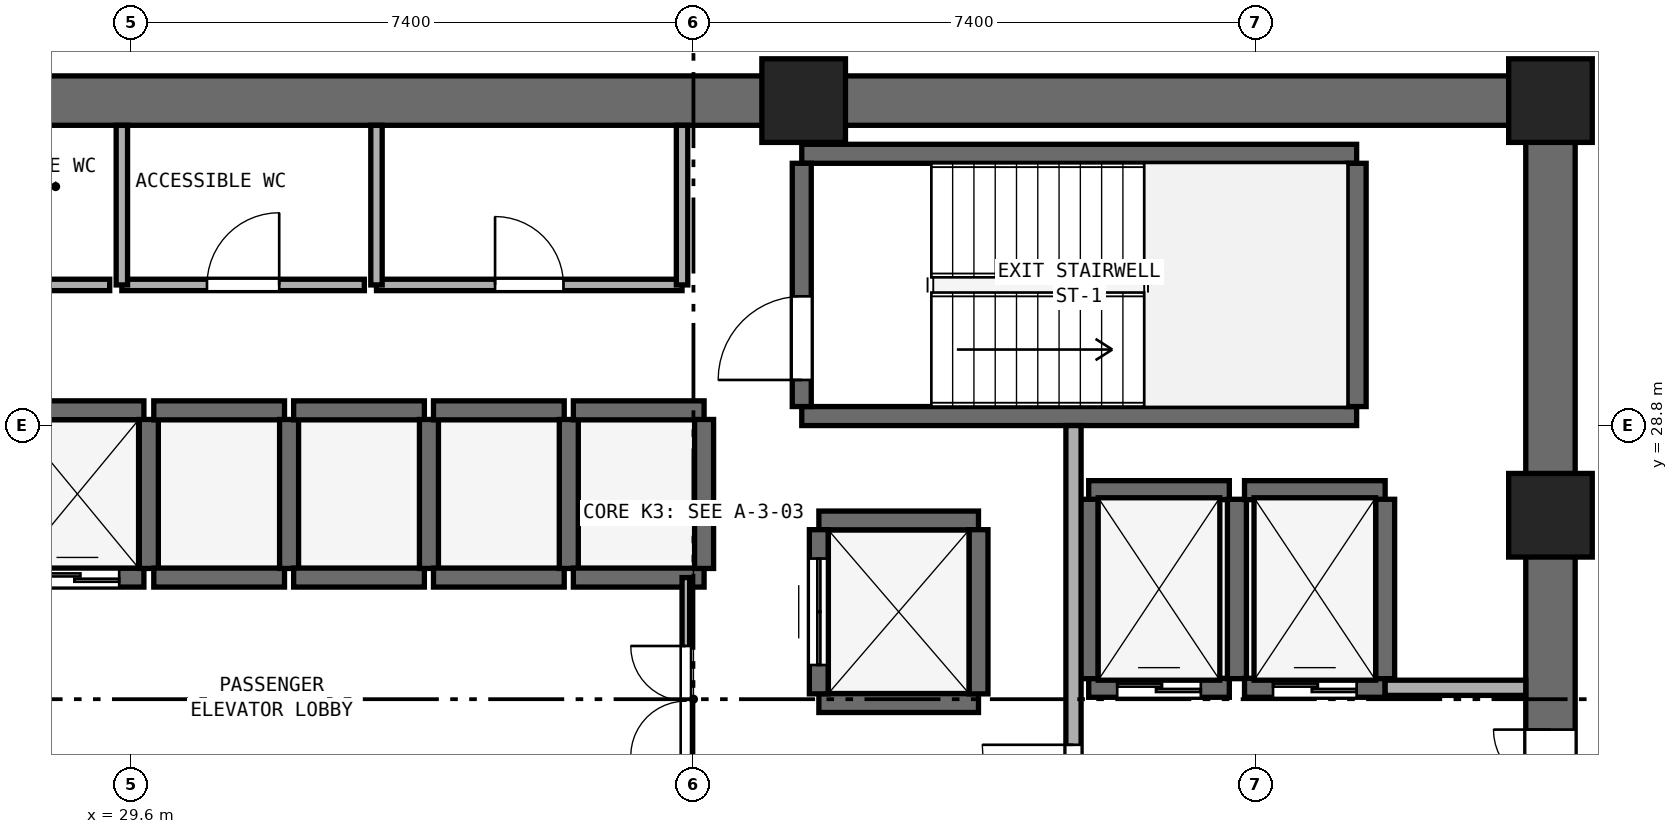
"""IFC4 building model, lengths in metres.
Left out: names, types, materials, properties, quantities, classifications, styles, units other than length and angle.
Written with IfcOpenShell. Run it as: python <this file> out.ifc"""

import sys

from ifc_helpers import new_model, si_unit, direction, frame, frame_2d, origin, origin_2d, place, context, subcontext, project, spatial, rectangle, extrude, element, fill, save


model = new_model("IFC4")
c1 = context("Model", 3, precision=1e-05, world=origin(), true_north=direction((0.0, 1.0)))
c2 = subcontext(c1, "Body", "Model", "MODEL_VIEW")
j1 = project(units=[si_unit("LENGTHUNIT", "METRE"), si_unit("PLANEANGLEUNIT", "RADIAN")], contexts=[c1])
p1 = place(None, origin())
s1 = spatial("IfcSite", under=j1, at=p1, CompositionType="ELEMENT")
p2 = place(p1, origin())
s2 = spatial("IfcBuilding", under=s1, at=p2, CompositionType="ELEMENT")
p3 = place(p2, frame((0.0, 0.0, 55.4)))
s3 = spatial("IfcBuildingStorey", under=s2, at=p3, CompositionType="ELEMENT", Elevation=55.4)
p4 = place(p3, frame((25.4, 33.075, 0.0), z_axis=(0.0, 0.0, 1.0), x_axis=(1.0, 0.0, 0.0)))
e1 = element("IfcWall", 1, at=p4, inside=s3, PredefinedType="SHEAR", context=c2, shape_type="SweptSolid", body=[
    extrude(rectangle(XDim=23.2, YDim=0.65, at=frame_2d((11.6, 0.0))), origin(), (0.0, 0.0, 1.0), 3.525),
])
p5 = place(p3, frame((48.275, 17.65, 0.0), z_axis=(0.0, 0.0, 1.0), x_axis=(0.0, 1.0, 0.0)))
e2 = element("IfcWall", 2, at=p5, inside=s3, PredefinedType="SHEAR", context=c2, shape_type="SweptSolid", body=[
    extrude(rectangle(XDim=15.1, YDim=0.65, at=frame_2d((7.55, 0.0))), origin(), (0.0, 0.0, 1.0), 3.525),
])
p6 = place(p5, frame((5.65, 0.0, 0.0)))
e3 = element("IfcOpeningElement", 3, at=p6, cuts=e2, PredefinedType="OPENING", context=c2, shape_type="SweptSolid", body=[
    extrude(rectangle(XDim=1.5, YDim=2.15, at=frame_2d((0.75, 1.075))), frame((0.0, 0.335, 0.0), z_axis=(0.0, -1.0, 0.0), x_axis=(1.0, 0.0, 0.0)), (0.0, 0.0, 1.0), 0.67),
])
for number, where, z_axis, x_axis in (
    (4, (48.275, 27.62, 0.0), (0.0, 0.0, 1.0), (1.0, 0.0, 0.0)),
    (5, (48.275, 33.075, 0.0), (0.0, 0.0, 1.0), (1.0, 0.0, 0.0)),
    (6, (38.45, 33.075, 0.0), (0.0, 0.0, 1.0), (1.0, 0.0, 0.0)),
):
    element("IfcColumn", number, at=place(p3, frame(where, z_axis=z_axis, x_axis=x_axis)), inside=s3, PredefinedType="PILASTER", context=c2, shape_type="SweptSolid", body=[
        extrude(rectangle(XDim=1.1, YDim=1.1, at=origin_2d()), origin(), (0.0, 0.0, 1.0), 3.8),
    ])
for number, where, z_axis, x_axis in (
    (7, (38.425, 28.925, 0.0), (0.0, 0.0, 1.0), (1.0, 0.0, 0.0)),
    (8, (38.425, 32.375, 0.0), (0.0, 0.0, 1.0), (1.0, 0.0, 0.0)),
):
    element("IfcWall", number, at=place(p3, frame(where, z_axis=z_axis, x_axis=x_axis)), inside=s3, PredefinedType="SHEAR", context=c2, shape_type="SweptSolid", body=[
        extrude(rectangle(XDim=7.3, YDim=0.25, at=frame_2d((3.65, 0.0))), origin(), (0.0, 0.0, 1.0), 3.525),
    ])
p7 = place(p3, frame((38.425, 29.05, 0.0), z_axis=(0.0, 0.0, 1.0), x_axis=(0.0, 1.0, 0.0)))
e9 = element("IfcWall", 9, at=p7, inside=s3, PredefinedType="SHEAR", context=c2, shape_type="SweptSolid", body=[
    extrude(rectangle(XDim=3.2, YDim=0.25, at=frame_2d((1.6, 0.0))), origin(), (0.0, 0.0, 1.0), 3.525),
])
p8 = place(p7, frame((0.35, 0.0, 0.0)))
e10 = element("IfcOpeningElement", 10, at=p8, cuts=e9, PredefinedType="OPENING", context=c2, shape_type="SweptSolid", body=[
    extrude(rectangle(XDim=1.1, YDim=2.15, at=frame_2d((0.55, 1.075))), frame((0.0, 0.135, 0.0), z_axis=(0.0, -1.0, 0.0), x_axis=(1.0, 0.0, 0.0)), (0.0, 0.0, 1.0), 0.27),
])
p9 = place(p3, frame((45.725, 29.05, 0.0), z_axis=(0.0, 0.0, 1.0), x_axis=(0.0, 1.0, 0.0)))
e11 = element("IfcWall", 11, at=p9, inside=s3, PredefinedType="SHEAR", context=c2, shape_type="SweptSolid", body=[
    extrude(rectangle(XDim=3.2, YDim=0.25, at=frame_2d((1.6, 0.0))), origin(), (0.0, 0.0, 1.0), 3.525),
])
p10 = place(p3, frame((28.02, 26.8, 0.0), z_axis=(0.0, 0.0, 1.0), x_axis=(1.0, 0.0, 0.0)))
e12 = element("IfcWall", 12, at=p10, inside=s3, PredefinedType="SHEAR", context=c2, shape_type="SweptSolid", body=[
    extrude(rectangle(XDim=1.75, YDim=0.25, at=frame_2d((0.875, 0.0))), origin(), (0.0, 0.0, 1.0), 3.525),
])
p11 = place(p10, frame((0.325, 0.0, 0.0)))
e13 = element("IfcOpeningElement", 13, at=p11, cuts=e12, PredefinedType="OPENING", context=c2, shape_type="SweptSolid", body=[
    extrude(rectangle(XDim=1.1, YDim=2.15, at=frame_2d((0.55, 1.075))), frame((0.0, 0.135, 0.0), z_axis=(0.0, -1.0, 0.0), x_axis=(1.0, 0.0, 0.0)), (0.0, 0.0, 1.0), 0.27),
])
p12 = place(p3, frame((28.02, 29.0, 0.0), z_axis=(0.0, 0.0, 1.0), x_axis=(1.0, 0.0, 0.0)))
e14 = element("IfcWall", 14, at=p12, inside=s3, PredefinedType="SHEAR", context=c2, shape_type="SweptSolid", body=[
    extrude(rectangle(XDim=1.75, YDim=0.25, at=frame_2d((0.875, 0.0))), origin(), (0.0, 0.0, 1.0), 3.525),
])
p13 = place(p3, frame((29.835, 26.92, 0.0), z_axis=(0.0, 0.0, 1.0), x_axis=(0.0, 1.0, 0.0)))
e15 = element("IfcWall", 15, at=p13, inside=s3, PredefinedType="SHEAR", context=c2, shape_type="SweptSolid", body=[
    extrude(rectangle(XDim=1.96, YDim=0.25, at=frame_2d((0.98, 0.0))), origin(), (0.0, 0.0, 1.0), 3.525),
])
for number, where, z_axis, x_axis in (
    (16, (29.9, 26.8, 0.0), (0.0, 0.0, 1.0), (1.0, 0.0, 0.0)),
    (17, (29.9, 29.0, 0.0), (0.0, 0.0, 1.0), (1.0, 0.0, 0.0)),
):
    element("IfcWall", number, at=place(p3, frame(where, z_axis=z_axis, x_axis=x_axis)), inside=s3, PredefinedType="SHEAR", context=c2, shape_type="SweptSolid", body=[
        extrude(rectangle(XDim=1.72, YDim=0.25, at=frame_2d((0.86, 0.0))), origin(), (0.0, 0.0, 1.0), 3.525),
    ])
p14 = place(p3, frame((31.68, 26.92, 0.0), z_axis=(0.0, 0.0, 1.0), x_axis=(0.0, 1.0, 0.0)))
e18 = element("IfcWall", 18, at=p14, inside=s3, PredefinedType="SHEAR", context=c2, shape_type="SweptSolid", body=[
    extrude(rectangle(XDim=1.96, YDim=0.25, at=frame_2d((0.98, 0.0))), origin(), (0.0, 0.0, 1.0), 3.525),
])
for number, where, z_axis, x_axis in (
    (19, (31.74, 26.8, 0.0), (0.0, 0.0, 1.0), (1.0, 0.0, 0.0)),
    (20, (31.74, 29.0, 0.0), (0.0, 0.0, 1.0), (1.0, 0.0, 0.0)),
):
    element("IfcWall", number, at=place(p3, frame(where, z_axis=z_axis, x_axis=x_axis)), inside=s3, PredefinedType="SHEAR", context=c2, shape_type="SweptSolid", body=[
        extrude(rectangle(XDim=1.72, YDim=0.25, at=frame_2d((0.86, 0.0))), origin(), (0.0, 0.0, 1.0), 3.525),
    ])
p15 = place(p3, frame((33.52, 26.92, 0.0), z_axis=(0.0, 0.0, 1.0), x_axis=(0.0, 1.0, 0.0)))
e21 = element("IfcWall", 21, at=p15, inside=s3, PredefinedType="SHEAR", context=c2, shape_type="SweptSolid", body=[
    extrude(rectangle(XDim=1.96, YDim=0.25, at=frame_2d((0.98, 0.0))), origin(), (0.0, 0.0, 1.0), 3.525),
])
for number, where, z_axis, x_axis in (
    (22, (33.58, 26.8, 0.0), (0.0, 0.0, 1.0), (1.0, 0.0, 0.0)),
    (23, (33.58, 29.0, 0.0), (0.0, 0.0, 1.0), (1.0, 0.0, 0.0)),
):
    element("IfcWall", number, at=place(p3, frame(where, z_axis=z_axis, x_axis=x_axis)), inside=s3, PredefinedType="SHEAR", context=c2, shape_type="SweptSolid", body=[
        extrude(rectangle(XDim=1.72, YDim=0.25, at=frame_2d((0.86, 0.0))), origin(), (0.0, 0.0, 1.0), 3.525),
    ])
p16 = place(p3, frame((35.36, 26.92, 0.0), z_axis=(0.0, 0.0, 1.0), x_axis=(0.0, 1.0, 0.0)))
e24 = element("IfcWall", 24, at=p16, inside=s3, PredefinedType="SHEAR", context=c2, shape_type="SweptSolid", body=[
    extrude(rectangle(XDim=1.96, YDim=0.25, at=frame_2d((0.98, 0.0))), origin(), (0.0, 0.0, 1.0), 3.525),
])
for number, where, z_axis, x_axis in (
    (25, (35.42, 26.8, 0.0), (0.0, 0.0, 1.0), (1.0, 0.0, 0.0)),
    (26, (35.42, 29.0, 0.0), (0.0, 0.0, 1.0), (1.0, 0.0, 0.0)),
):
    element("IfcWall", number, at=place(p3, frame(where, z_axis=z_axis, x_axis=x_axis)), inside=s3, PredefinedType="SHEAR", context=c2, shape_type="SweptSolid", body=[
        extrude(rectangle(XDim=1.72, YDim=0.25, at=frame_2d((0.86, 0.0))), origin(), (0.0, 0.0, 1.0), 3.525),
    ])
p17 = place(p3, frame((37.14, 26.92, 0.0), z_axis=(0.0, 0.0, 1.0), x_axis=(0.0, 1.0, 0.0)))
e27 = element("IfcWall", 27, at=p17, inside=s3, PredefinedType="SHEAR", context=c2, shape_type="SweptSolid", body=[
    extrude(rectangle(XDim=1.96, YDim=0.25, at=frame_2d((0.98, 0.0))), origin(), (0.0, 0.0, 1.0), 3.525),
])
p18 = place(p3, frame((42.2, 25.35, 0.0), z_axis=(0.0, 0.0, 1.0), x_axis=(1.0, 0.0, 0.0)))
e28 = element("IfcWall", 28, at=p18, inside=s3, PredefinedType="SHEAR", context=c2, shape_type="SweptSolid", body=[
    extrude(rectangle(XDim=1.85, YDim=0.25, at=frame_2d((0.925, 0.0))), origin(), (0.0, 0.0, 1.0), 3.525),
])
p19 = place(p18, frame((0.375, 0.0, 0.0)))
e29 = element("IfcOpeningElement", 29, at=p19, cuts=e28, PredefinedType="OPENING", context=c2, shape_type="SweptSolid", body=[
    extrude(rectangle(XDim=1.1, YDim=2.15, at=frame_2d((0.55, 1.075))), frame((0.0, 0.135, 0.0), z_axis=(0.0, -1.0, 0.0), x_axis=(1.0, 0.0, 0.0)), (0.0, 0.0, 1.0), 0.27),
])
p20 = place(p3, frame((42.2, 27.95, 0.0), z_axis=(0.0, 0.0, 1.0), x_axis=(1.0, 0.0, 0.0)))
e30 = element("IfcWall", 30, at=p20, inside=s3, PredefinedType="SHEAR", context=c2, shape_type="SweptSolid", body=[
    extrude(rectangle(XDim=1.85, YDim=0.25, at=frame_2d((0.925, 0.0))), origin(), (0.0, 0.0, 1.0), 3.525),
])
for number, where, z_axis, x_axis in (
    (31, (42.2, 25.47, 0.0), (0.0, 0.0, 1.0), (0.0, 1.0, 0.0)),
    (32, (44.15, 25.47, 0.0), (0.0, 0.0, 1.0), (0.0, 1.0, 0.0)),
):
    element("IfcWall", number, at=place(p3, frame(where, z_axis=z_axis, x_axis=x_axis)), inside=s3, PredefinedType="SHEAR", context=c2, shape_type="SweptSolid", body=[
        extrude(rectangle(XDim=2.36, YDim=0.25, at=frame_2d((1.18, 0.0))), origin(), (0.0, 0.0, 1.0), 3.525),
    ])
p21 = place(p3, frame((44.25, 25.35, 0.0), z_axis=(0.0, 0.0, 1.0), x_axis=(1.0, 0.0, 0.0)))
e33 = element("IfcWall", 33, at=p21, inside=s3, PredefinedType="SHEAR", context=c2, shape_type="SweptSolid", body=[
    extrude(rectangle(XDim=1.85, YDim=0.25, at=frame_2d((0.925, 0.0))), origin(), (0.0, 0.0, 1.0), 3.525),
])
p22 = place(p21, frame((0.375, 0.0, 0.0)))
e34 = element("IfcOpeningElement", 34, at=p22, cuts=e33, PredefinedType="OPENING", context=c2, shape_type="SweptSolid", body=[
    extrude(rectangle(XDim=1.1, YDim=2.15, at=frame_2d((0.55, 1.075))), frame((0.0, 0.135, 0.0), z_axis=(0.0, -1.0, 0.0), x_axis=(1.0, 0.0, 0.0)), (0.0, 0.0, 1.0), 0.27),
])
p23 = place(p3, frame((44.25, 27.95, 0.0), z_axis=(0.0, 0.0, 1.0), x_axis=(1.0, 0.0, 0.0)))
e35 = element("IfcWall", 35, at=p23, inside=s3, PredefinedType="SHEAR", context=c2, shape_type="SweptSolid", body=[
    extrude(rectangle(XDim=1.85, YDim=0.25, at=frame_2d((0.925, 0.0))), origin(), (0.0, 0.0, 1.0), 3.525),
])
p24 = place(p3, frame((46.1, 25.47, 0.0), z_axis=(0.0, 0.0, 1.0), x_axis=(0.0, 1.0, 0.0)))
e36 = element("IfcWall", 36, at=p24, inside=s3, PredefinedType="SHEAR", context=c2, shape_type="SweptSolid", body=[
    extrude(rectangle(XDim=2.36, YDim=0.25, at=frame_2d((1.18, 0.0))), origin(), (0.0, 0.0, 1.0), 3.525),
])
for number, where, z_axis, x_axis in (
    (37, (38.65, 25.15, 0.0), (0.0, 0.0, 1.0), (1.0, 0.0, 0.0)),
    (38, (38.65, 27.55, 0.0), (0.0, 0.0, 1.0), (1.0, 0.0, 0.0)),
):
    element("IfcWall", number, at=place(p3, frame(where, z_axis=z_axis, x_axis=x_axis)), inside=s3, PredefinedType="SHEAR", context=c2, shape_type="SweptSolid", body=[
        extrude(rectangle(XDim=2.1, YDim=0.25, at=frame_2d((1.05, 0.0))), origin(), (0.0, 0.0, 1.0), 3.525),
    ])
p25 = place(p3, frame((38.65, 25.27, 0.0), z_axis=(0.0, 0.0, 1.0), x_axis=(0.0, 1.0, 0.0)))
e39 = element("IfcWall", 39, at=p25, inside=s3, PredefinedType="SHEAR", context=c2, shape_type="SweptSolid", body=[
    extrude(rectangle(XDim=2.16, YDim=0.25, at=frame_2d((1.08, 0.0))), origin(), (0.0, 0.0, 1.0), 3.525),
])
p26 = place(p25, frame((0.38, 0.0, 0.0)))
e40 = element("IfcOpeningElement", 40, at=p26, cuts=e39, PredefinedType="OPENING", context=c2, shape_type="SweptSolid", body=[
    extrude(rectangle(XDim=1.4, YDim=2.2, at=frame_2d((0.7, 1.1))), frame((0.0, 0.135, 0.0), z_axis=(0.0, -1.0, 0.0), x_axis=(1.0, 0.0, 0.0)), (0.0, 0.0, 1.0), 0.27),
])
p27 = place(p3, frame((40.75, 25.27, 0.0), z_axis=(0.0, 0.0, 1.0), x_axis=(0.0, 1.0, 0.0)))
e41 = element("IfcWall", 41, at=p27, inside=s3, PredefinedType="SHEAR", context=c2, shape_type="SweptSolid", body=[
    extrude(rectangle(XDim=2.16, YDim=0.25, at=frame_2d((1.08, 0.0))), origin(), (0.0, 0.0, 1.0), 3.525),
])
p28 = place(p3, frame((42.0, 22.75, 0.0), z_axis=(0.0, 0.0, 1.0), x_axis=(0.0, 1.0, 0.0)))
e42 = element("IfcWall", 42, at=p28, inside=s3, PredefinedType="SOLIDWALL", context=c2, shape_type="SweptSolid", body=[
    extrude(rectangle(XDim=6.05, YDim=0.2, at=frame_2d((3.025, 0.0))), origin(), (0.0, 0.0, 1.0), 3.525),
])
p29 = place(p28, frame((0.65, 0.0, 0.0)))
e43 = element("IfcOpeningElement", 43, at=p29, cuts=e42, PredefinedType="OPENING", context=c2, shape_type="SweptSolid", body=[
    extrude(rectangle(XDim=1.2, YDim=2.15, at=frame_2d((0.6, 1.075))), frame((0.0, 0.11, 0.0), z_axis=(0.0, -1.0, 0.0), x_axis=(1.0, 0.0, 0.0)), (0.0, 0.0, 1.0), 0.22),
])
p30 = place(p3, frame((46.1, 25.35, 0.0), z_axis=(0.0, 0.0, 1.0), x_axis=(1.0, 0.0, 0.0)))
e44 = element("IfcWall", 44, at=p30, inside=s3, PredefinedType="SOLIDWALL", context=c2, shape_type="SweptSolid", body=[
    extrude(rectangle(XDim=1.85, YDim=0.2, at=frame_2d((0.925, 0.0))), origin(), (0.0, 0.0, 1.0), 3.525),
])
p31 = place(p3, frame((26.17, 30.65, 0.0), z_axis=(0.0, 0.0, 1.0), x_axis=(1.0, 0.0, 0.0)))
e45 = element("IfcWall", 45, at=p31, inside=s3, PredefinedType="PARTITIONING", context=c2, shape_type="SweptSolid", body=[
    extrude(rectangle(XDim=3.15, YDim=0.15, at=frame_2d((1.575, 0.0))), origin(), (0.0, 0.0, 1.0), 3.525),
])
p32 = place(p31, frame((1.1, 0.0, 0.0)))
e46 = element("IfcOpeningElement", 46, at=p32, cuts=e45, PredefinedType="OPENING", context=c2, shape_type="SweptSolid", body=[
    extrude(rectangle(XDim=0.95, YDim=2.1, at=frame_2d((0.475, 1.05))), frame((0.0, 0.085, 0.0), z_axis=(0.0, -1.0, 0.0), x_axis=(1.0, 0.0, 0.0)), (0.0, 0.0, 1.0), 0.17),
])
p33 = place(p3, frame((29.48, 30.65, 0.0), z_axis=(0.0, 0.0, 1.0), x_axis=(1.0, 0.0, 0.0)))
e47 = element("IfcWall", 47, at=p33, inside=s3, PredefinedType="PARTITIONING", context=c2, shape_type="SweptSolid", body=[
    extrude(rectangle(XDim=3.19, YDim=0.15, at=frame_2d((1.595, 0.0))), origin(), (0.0, 0.0, 1.0), 3.525),
])
p34 = place(p33, frame((1.12, 0.0, 0.0)))
e48 = element("IfcOpeningElement", 48, at=p34, cuts=e47, PredefinedType="OPENING", context=c2, shape_type="SweptSolid", body=[
    extrude(rectangle(XDim=0.95, YDim=2.1, at=frame_2d((0.475, 1.05))), frame((0.0, 0.085, 0.0), z_axis=(0.0, -1.0, 0.0), x_axis=(1.0, 0.0, 0.0)), (0.0, 0.0, 1.0), 0.17),
])
p35 = place(p3, frame((29.48, 30.65, 0.0), z_axis=(0.0, 0.0, 1.0), x_axis=(0.0, 1.0, 0.0)))
e49 = element("IfcWall", 49, at=p35, inside=s3, PredefinedType="PARTITIONING", context=c2, shape_type="SweptSolid", body=[
    extrude(rectangle(XDim=2.1, YDim=0.15, at=frame_2d((1.05, 0.0))), origin(), (0.0, 0.0, 1.0), 3.525),
])
p36 = place(p3, frame((32.83, 30.65, 0.0), z_axis=(0.0, 0.0, 1.0), x_axis=(1.0, 0.0, 0.0)))
e50 = element("IfcWall", 50, at=p36, inside=s3, PredefinedType="PARTITIONING", context=c2, shape_type="SweptSolid", body=[
    extrude(rectangle(XDim=4.02, YDim=0.15, at=frame_2d((2.01, 0.0))), origin(), (0.0, 0.0, 1.0), 3.525),
])
p37 = place(p36, frame((1.56, 0.0, 0.0)))
e51 = element("IfcOpeningElement", 51, at=p37, cuts=e50, PredefinedType="OPENING", context=c2, shape_type="SweptSolid", body=[
    extrude(rectangle(XDim=0.9, YDim=2.1, at=frame_2d((0.45, 1.05))), frame((0.0, 0.085, 0.0), z_axis=(0.0, -1.0, 0.0), x_axis=(1.0, 0.0, 0.0)), (0.0, 0.0, 1.0), 0.17),
])
for number, where, z_axis, x_axis in (
    (52, (32.83, 30.65, 0.0), (0.0, 0.0, 1.0), (0.0, 1.0, 0.0)),
    (53, (36.85, 30.65, 0.0), (0.0, 0.0, 1.0), (0.0, 1.0, 0.0)),
):
    element("IfcWall", number, at=place(p3, frame(where, z_axis=z_axis, x_axis=x_axis)), inside=s3, PredefinedType="PARTITIONING", context=c2, shape_type="SweptSolid", body=[
        extrude(rectangle(XDim=2.1, YDim=0.15, at=frame_2d((1.05, 0.0))), origin(), (0.0, 0.0, 1.0), 3.525),
    ])
p38 = place(p3, frame((36.9, 23.6, 0.0), z_axis=(0.0, 0.0, 1.0), x_axis=(0.0, 1.0, 0.0)))
e54 = element("IfcWall", 54, at=p38, inside=s3, PredefinedType="PARTITIONING", context=c2, shape_type="SweptSolid", body=[
    extrude(rectangle(XDim=3.2, YDim=0.1, at=frame_2d((1.6, 0.0))), origin(), (0.0, 0.0, 1.0), 3.525),
])
p39 = place(p38, frame((0.85, 0.0, 0.0)))
e55 = element("IfcOpeningElement", 55, at=p39, cuts=e54, PredefinedType="OPENING", context=c2, shape_type="SweptSolid", body=[
    extrude(rectangle(XDim=1.45, YDim=2.12, at=frame_2d((0.725, 1.06))), frame((0.0, 0.06, 0.0), z_axis=(0.0, -1.0, 0.0), x_axis=(1.0, 0.0, 0.0)), (0.0, 0.0, 1.0), 0.12),
])
p40 = place(p8, origin())
e56 = element("IfcDoor", 56, at=p40, inside=s3, OperationType="SINGLE_SWING_LEFT", PredefinedType="DOOR", context=c2, shape_type="SweptSolid", body=[
    extrude(rectangle(XDim=1.1, YDim=2.15, at=frame_2d((0.55, 1.075))), frame((0.0, 0.025, 0.0), z_axis=(0.0, -1.0, 0.0), x_axis=(1.0, 0.0, 0.0)), (0.0, 0.0, 1.0), 0.05),
])
fill(e10, e56)
p41 = place(p11, origin())
e57 = element("IfcDoor", 57, at=p41, inside=s3, OperationType="DOUBLE_DOOR_SLIDING", PredefinedType="DOOR", context=c2, shape_type="SweptSolid", body=[
    extrude(rectangle(XDim=1.1, YDim=2.15, at=frame_2d((0.55, 1.075))), frame((0.0, 0.025, 0.0), z_axis=(0.0, -1.0, 0.0), x_axis=(1.0, 0.0, 0.0)), (0.0, 0.0, 1.0), 0.05),
])
fill(e13, e57)
p42 = place(p19, origin())
e58 = element("IfcDoor", 58, at=p42, inside=s3, OperationType="DOUBLE_DOOR_SLIDING", PredefinedType="DOOR", context=c2, shape_type="SweptSolid", body=[
    extrude(rectangle(XDim=1.1, YDim=2.15, at=frame_2d((0.55, 1.075))), frame((0.0, 0.025, 0.0), z_axis=(0.0, -1.0, 0.0), x_axis=(1.0, 0.0, 0.0)), (0.0, 0.0, 1.0), 0.05),
])
fill(e29, e58)
p43 = place(p22, origin())
e59 = element("IfcDoor", 59, at=p43, inside=s3, OperationType="DOUBLE_DOOR_SLIDING", PredefinedType="DOOR", context=c2, shape_type="SweptSolid", body=[
    extrude(rectangle(XDim=1.1, YDim=2.15, at=frame_2d((0.55, 1.075))), frame((0.0, 0.025, 0.0), z_axis=(0.0, -1.0, 0.0), x_axis=(1.0, 0.0, 0.0)), (0.0, 0.0, 1.0), 0.05),
])
fill(e34, e59)
p44 = place(p26, origin())
e60 = element("IfcDoor", 60, at=p44, inside=s3, OperationType="DOUBLE_DOOR_SLIDING", PredefinedType="DOOR", context=c2, shape_type="SweptSolid", body=[
    extrude(rectangle(XDim=1.4, YDim=2.2, at=frame_2d((0.7, 1.1))), frame((0.0, 0.025, 0.0), z_axis=(0.0, -1.0, 0.0), x_axis=(1.0, 0.0, 0.0)), (0.0, 0.0, 1.0), 0.05),
])
fill(e40, e60)
p45 = place(p29, origin())
e61 = element("IfcDoor", 61, at=p45, inside=s3, OperationType="SINGLE_SWING_RIGHT", PredefinedType="DOOR", context=c2, shape_type="SweptSolid", body=[
    extrude(rectangle(XDim=1.2, YDim=2.15, at=frame_2d((0.6, 1.075))), frame((0.0, 0.025, 0.0), z_axis=(0.0, -1.0, 0.0), x_axis=(1.0, 0.0, 0.0)), (0.0, 0.0, 1.0), 0.05),
])
fill(e43, e61)
p46 = place(p6, origin())
e62 = element("IfcDoor", 62, at=p46, inside=s3, OperationType="DOUBLE_DOOR_SINGLE_SWING", PredefinedType="DOOR", context=c2, shape_type="SweptSolid", body=[
    extrude(rectangle(XDim=1.5, YDim=2.15, at=frame_2d((0.75, 1.075))), frame((0.0, 0.025, 0.0), z_axis=(0.0, -1.0, 0.0), x_axis=(1.0, 0.0, 0.0)), (0.0, 0.0, 1.0), 0.05),
])
fill(e3, e62)
p47 = place(p34, origin())
e63 = element("IfcDoor", 63, at=p47, inside=s3, OperationType="SINGLE_SWING_RIGHT", PredefinedType="DOOR", context=c2, shape_type="SweptSolid", body=[
    extrude(rectangle(XDim=0.95, YDim=2.1, at=frame_2d((0.475, 1.05))), frame((0.0, 0.025, 0.0), z_axis=(0.0, -1.0, 0.0), x_axis=(1.0, 0.0, 0.0)), (0.0, 0.0, 1.0), 0.05),
])
fill(e48, e63)
p48 = place(p37, origin())
e64 = element("IfcDoor", 64, at=p48, inside=s3, OperationType="SINGLE_SWING_LEFT", PredefinedType="DOOR", context=c2, shape_type="SweptSolid", body=[
    extrude(rectangle(XDim=0.9, YDim=2.1, at=frame_2d((0.45, 1.05))), frame((0.0, 0.025, 0.0), z_axis=(0.0, -1.0, 0.0), x_axis=(1.0, 0.0, 0.0)), (0.0, 0.0, 1.0), 0.05),
])
fill(e51, e64)
p49 = place(p39, origin())
e65 = element("IfcDoor", 65, at=p49, inside=s3, OperationType="DOUBLE_DOOR_SINGLE_SWING", PredefinedType="DOOR", context=c2, shape_type="SweptSolid", body=[
    extrude(rectangle(XDim=1.45, YDim=2.12, at=frame_2d((0.725, 1.06))), frame((0.0, 0.025, 0.0), z_axis=(0.0, -1.0, 0.0), x_axis=(1.0, 0.0, 0.0)), (0.0, 0.0, 1.0), 0.05),
])
fill(e55, e65)
save(model, sys.argv[1])
